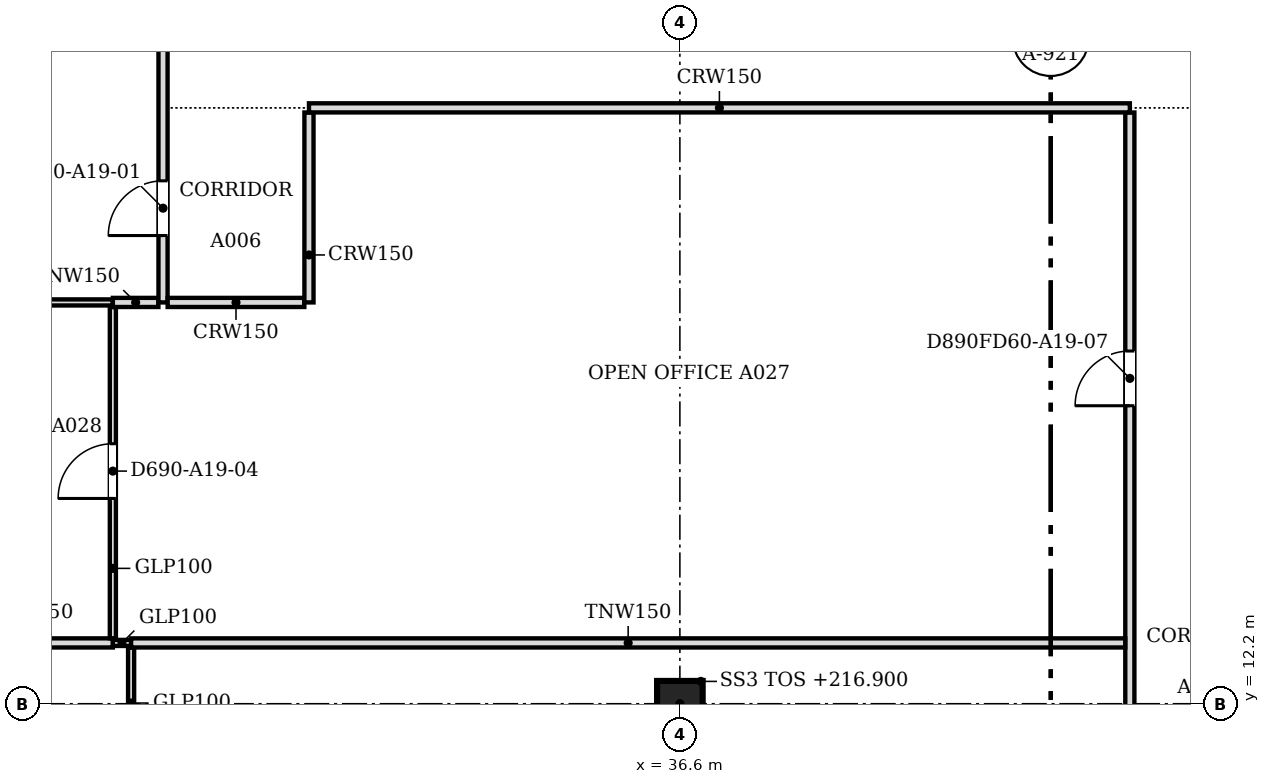
"""IFC4 building model, lengths in metres.
Left out: names, types, materials, properties, quantities, classifications, styles, units other than length and angle.
Written with IfcOpenShell. Run it as: python <this file> out.ifc"""

import sys

from ifc_helpers import new_model, si_unit, direction, frame, frame_2d, origin, origin_2d, place, context, subcontext, project, spatial, rectangle, extrude, source, transform, mapped, element, fill, save


model = new_model("IFC4")
c1 = context("Model", 3, precision=1e-05, world=origin(), true_north=direction((0.0, 1.0)))
c2 = subcontext(c1, "Body", "Model", "MODEL_VIEW")
j1 = project(units=[si_unit("LENGTHUNIT", "METRE"), si_unit("PLANEANGLEUNIT", "RADIAN")], contexts=[c1])
p1 = place(None, origin())
s1 = spatial("IfcSite", under=j1, at=p1, CompositionType="ELEMENT")
p2 = place(p1, origin())
s2 = spatial("IfcBuilding", under=s1, at=p2, CompositionType="ELEMENT")
p3 = place(p2, frame((0.0, 0.0, 216.9)))
s3 = spatial("IfcBuildingStorey", under=s2, at=p3, CompositionType="ELEMENT", Elevation=216.9)
p4 = place(p3, frame((36.6, 12.2, 0.0), z_axis=(0.0, 0.0, 1.0), x_axis=(1.0, 0.0, 0.0)))
e1 = element("IfcColumn", 1, at=p4, inside=s3, PredefinedType="COLUMN", context=c2, shape_type="SweptSolid", body=[
    extrude(rectangle(XDim=0.75, YDim=0.75, at=origin_2d()), origin(), (0.0, 0.0, 1.0), 3.6),
])
p5 = place(p3, frame((44.0, 0.5, 0.0), z_axis=(0.0, 0.0, 1.0), x_axis=(0.0, 1.0, 0.0)))
e2 = element("IfcWall", 2, at=p5, inside=s3, PredefinedType="PARTITIONING", context=c2, shape_type="SweptSolid", body=[
    extrude(rectangle(XDim=21.424, YDim=0.15, at=frame_2d((10.712, 0.0))), origin(), (0.0, 0.0, 1.0), 3.067),
])
m1 = source(origin(), c2, "Body", "SweptSolid", [
    extrude(rectangle(XDim=0.9, YDim=2.1, at=frame_2d((0.45, 1.05))), frame((0.0, 0.085, 0.0), z_axis=(0.0, -1.0, 0.0), x_axis=(1.0, 0.0, 0.0)), (0.0, 0.0, 1.0), 0.17),
])
p6 = place(p5, frame((16.601, 0.0, 0.0)))
e3 = element("IfcOpeningElement", 3, at=p6, cuts=e2, PredefinedType="OPENING", context=c2, shape_type="MappedRepresentation", body=[
    mapped(m1, transform((0.0, 0.0, 0.0), scale=1.0)),
])
p7 = place(p5, frame((7.7, 0.0, 0.0)))
e4 = element("IfcOpeningElement", 4, at=p7, cuts=e2, PredefinedType="OPENING", context=c2, shape_type="MappedRepresentation", body=[
    mapped(m1, transform((0.0, 0.0, 0.0), scale=1.0)),
])
p8 = place(p3, frame((27.575, 8.599, 0.0), z_axis=(0.0, 0.0, 1.0), x_axis=(0.0, 1.0, 0.0)))
e5 = element("IfcWall", 5, at=p8, inside=s3, PredefinedType="PARTITIONING", context=c2, shape_type="SweptSolid", body=[
    extrude(rectangle(XDim=4.525, YDim=0.1, at=frame_2d((2.263, 0.0))), origin(), (0.0, 0.0, 1.0), 3.067),
])
m2 = source(origin(), c2, "Body", "SweptSolid", [
    extrude(rectangle(XDim=0.9, YDim=2.1, at=frame_2d((0.45, 1.05))), frame((0.0, 0.06, 0.0), z_axis=(0.0, -1.0, 0.0), x_axis=(1.0, 0.0, 0.0)), (0.0, 0.0, 1.0), 0.12),
])
p9 = place(p8, frame((1.8, 0.0, 0.0)))
e6 = element("IfcOpeningElement", 6, at=p9, cuts=e5, PredefinedType="OPENING", context=c2, shape_type="MappedRepresentation", body=[
    mapped(m2, transform((0.0, 0.0, 0.0), scale=1.0)),
])
p10 = place(p3, frame((24.55, 13.2, 0.0), z_axis=(0.0, 0.0, 1.0), x_axis=(1.0, 0.0, 0.0)))
e7 = element("IfcWall", 7, at=p10, inside=s3, PredefinedType="PARTITIONING", context=c2, shape_type="SweptSolid", body=[
    extrude(rectangle(XDim=2.725, YDim=0.15, at=frame_2d((1.362, 0.0))), origin(), (0.0, 0.0, 1.0), 3.067),
])
p11 = place(p3, frame((27.276, 13.2, 0.0), z_axis=(0.0, 0.0, 1.0), x_axis=(1.0, 0.0, 0.0)))
e8 = element("IfcWall", 8, at=p11, inside=s3, PredefinedType="PARTITIONING", context=c2, shape_type="SweptSolid", body=[
    extrude(rectangle(XDim=0.298, YDim=0.1, at=frame_2d((0.149, 0.0))), origin(), (0.0, 0.0, 1.0), 3.067),
])
p12 = place(p3, frame((27.575, 13.2, 0.0), z_axis=(0.0, 0.0, 1.0), x_axis=(1.0, 0.0, 0.0)))
e9 = element("IfcWall", 9, at=p12, inside=s3, PredefinedType="PARTITIONING", context=c2, shape_type="SweptSolid", body=[
    extrude(rectangle(XDim=16.349, YDim=0.15, at=frame_2d((8.175, 0.0))), origin(), (0.0, 0.0, 1.0), 3.067),
])
p13 = place(p3, frame((27.275, 13.276, 0.0), z_axis=(0.0, 0.0, 1.0), x_axis=(0.0, 1.0, 0.0)))
e10 = element("IfcWall", 10, at=p13, inside=s3, PredefinedType="PARTITIONING", context=c2, shape_type="SweptSolid", body=[
    extrude(rectangle(XDim=5.448, YDim=0.1, at=frame_2d((2.724, 0.0))), origin(), (0.0, 0.0, 1.0), 3.067),
])
p14 = place(p13, frame((2.3, 0.0, 0.0)))
e11 = element("IfcOpeningElement", 11, at=p14, cuts=e10, PredefinedType="OPENING", context=c2, shape_type="MappedRepresentation", body=[
    mapped(m2, transform((0.0, 0.0, 0.0), scale=1.0)),
])
p15 = place(p3, frame((22.0, 18.8, 0.0), z_axis=(0.0, 0.0, 1.0), x_axis=(1.0, 0.0, 0.0)))
e12 = element("IfcWall", 12, at=p15, inside=s3, PredefinedType="PARTITIONING", context=c2, shape_type="SweptSolid", body=[
    extrude(rectangle(XDim=5.274, YDim=0.1, at=frame_2d((2.637, 0.0))), origin(), (0.0, 0.0, 1.0), 3.067),
])
p16 = place(p3, frame((27.275, 18.8, 0.0), z_axis=(0.0, 0.0, 1.0), x_axis=(1.0, 0.0, 0.0)))
e13 = element("IfcWall", 13, at=p16, inside=s3, PredefinedType="PARTITIONING", context=c2, shape_type="SweptSolid", body=[
    extrude(rectangle(XDim=0.749, YDim=0.15, at=frame_2d((0.375, 0.0))), origin(), (0.0, 0.0, 1.0), 3.067),
])
p17 = place(p3, frame((28.1, 18.8, 0.0), z_axis=(0.0, 0.0, 1.0), x_axis=(0.0, 1.0, 0.0)))
e14 = element("IfcWall", 14, at=p17, inside=s3, PredefinedType="PARTITIONING", context=c2, shape_type="SweptSolid", body=[
    extrude(rectangle(XDim=26.024, YDim=0.15, at=frame_2d((13.012, 0.0))), origin(), (0.0, 0.0, 1.0), 3.067),
])
p18 = place(p17, frame((1.1, 0.0, 0.0)))
e15 = element("IfcOpeningElement", 15, at=p18, cuts=e14, PredefinedType="OPENING", context=c2, shape_type="MappedRepresentation", body=[
    mapped(m1, transform((0.0, 0.0, 0.0), scale=1.0)),
])
m3 = source(origin(), c2, "Body", "SweptSolid", [
    extrude(rectangle(XDim=1.0, YDim=2.1, at=frame_2d((0.5, 1.05))), frame((0.0, 0.085, 0.0), z_axis=(0.0, -1.0, 0.0), x_axis=(1.0, 0.0, 0.0)), (0.0, 0.0, 1.0), 0.17),
])
p19 = place(p17, frame((14.201, 0.0, 0.0)))
e16 = element("IfcOpeningElement", 16, at=p19, cuts=e14, PredefinedType="OPENING", context=c2, shape_type="MappedRepresentation", body=[
    mapped(m3, transform((0.0, 0.0, 0.0), scale=1.0)),
])
p20 = place(p17, frame((8.1, 0.0, 0.0)))
e17 = element("IfcOpeningElement", 17, at=p20, cuts=e14, PredefinedType="OPENING", context=c2, shape_type="MappedRepresentation", body=[
    mapped(m3, transform((0.0, 0.0, 0.0), scale=1.0)),
])
p21 = place(p17, frame((21.5, 0.0, 0.0)))
e18 = element("IfcOpeningElement", 18, at=p21, cuts=e14, PredefinedType="OPENING", context=c2, shape_type="MappedRepresentation", body=[
    mapped(m1, transform((0.0, 0.0, 0.0), scale=1.0)),
])
p22 = place(p3, frame((28.176, 18.8, 0.0), z_axis=(0.0, 0.0, 1.0), x_axis=(1.0, 0.0, 0.0)))
e19 = element("IfcWall", 19, at=p22, inside=s3, PredefinedType="PARTITIONING", context=c2, shape_type="SweptSolid", body=[
    extrude(rectangle(XDim=2.248, YDim=0.15, at=frame_2d((1.124, 0.0))), origin(), (0.0, 0.0, 1.0), 3.067),
])
p23 = place(p3, frame((30.5, 18.8, 0.0), z_axis=(0.0, 0.0, 1.0), x_axis=(0.0, 1.0, 0.0)))
e20 = element("IfcWall", 20, at=p23, inside=s3, PredefinedType="PARTITIONING", context=c2, shape_type="SweptSolid", body=[
    extrude(rectangle(XDim=3.124, YDim=0.15, at=frame_2d((1.562, 0.0))), origin(), (0.0, 0.0, 1.0), 3.067),
])
p24 = place(p3, frame((30.5, 22.0, 0.0), z_axis=(0.0, 0.0, 1.0), x_axis=(1.0, 0.0, 0.0)))
e21 = element("IfcWall", 21, at=p24, inside=s3, PredefinedType="PARTITIONING", context=c2, shape_type="SweptSolid", body=[
    extrude(rectangle(XDim=13.5, YDim=0.15, at=frame_2d((6.75, 0.0))), origin(), (0.0, 0.0, 1.0), 3.067),
])
m4 = source(origin(), c2, "Body", "SweptSolid", [
    extrude(rectangle(XDim=0.9, YDim=2.1, at=frame_2d((0.45, 1.05))), frame((0.0, 0.025, 0.0), z_axis=(0.0, -1.0, 0.0), x_axis=(1.0, 0.0, 0.0)), (0.0, 0.0, 1.0), 0.05),
])
p25 = place(p18, origin())
e22 = element("IfcDoor", 22, at=p25, inside=s3, OperationType="SINGLE_SWING_LEFT", PredefinedType="DOOR", context=c2, shape_type="MappedRepresentation", body=[
    mapped(m4, transform((0.0, 0.0, 0.0), scale=1.0)),
])
fill(e15, e22)
p26 = place(p14, origin())
e23 = element("IfcDoor", 23, at=p26, inside=s3, OperationType="SINGLE_SWING_LEFT", PredefinedType="DOOR", context=c2, shape_type="MappedRepresentation", body=[
    mapped(m4, transform((0.0, 0.0, 0.0), scale=1.0)),
])
fill(e11, e23)
p27 = place(p6, origin())
e24 = element("IfcDoor", 24, at=p27, inside=s3, OperationType="SINGLE_SWING_LEFT", PredefinedType="DOOR", context=c2, shape_type="MappedRepresentation", body=[
    mapped(m4, transform((0.0, 0.0, 0.0), scale=1.0)),
])
fill(e3, e24)
save(model, sys.argv[1])
